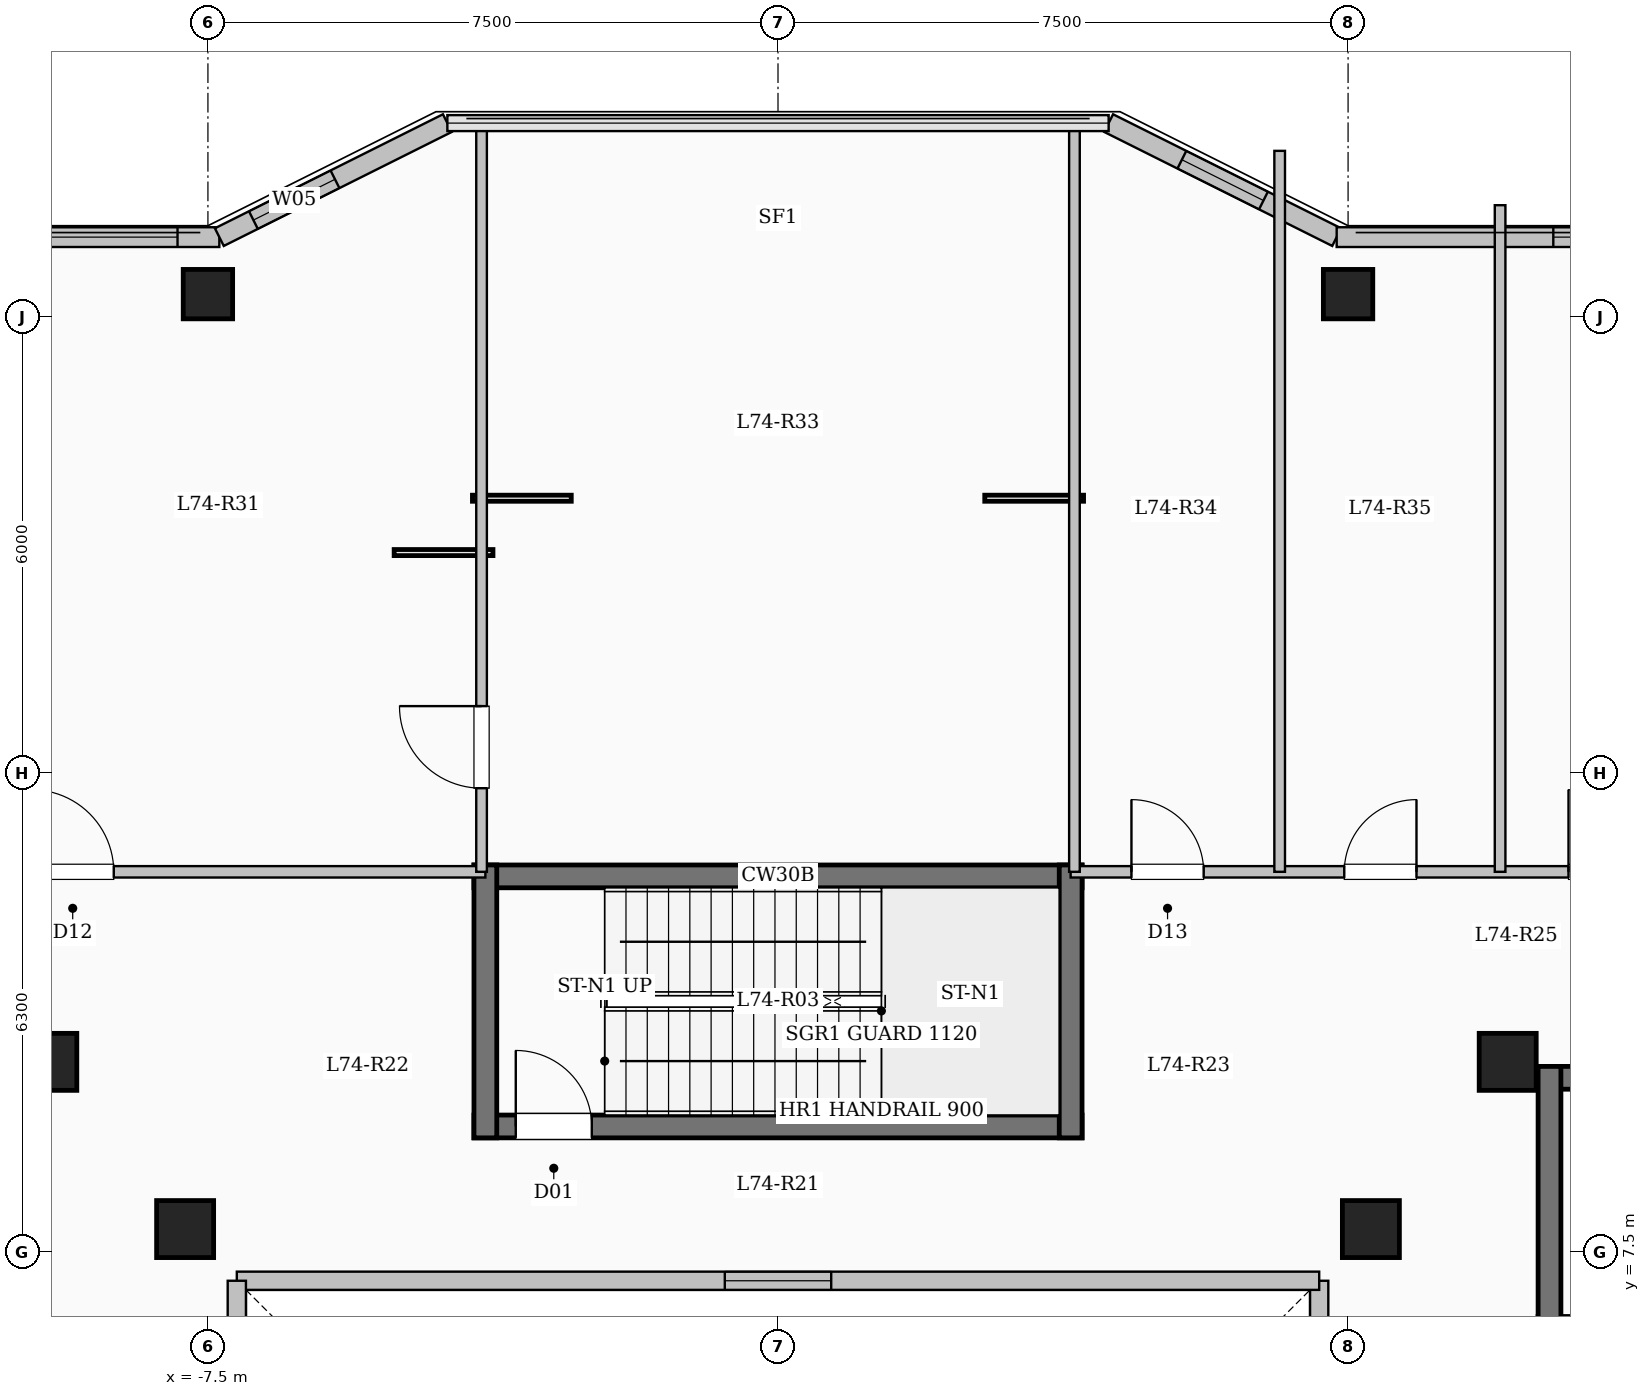
"""IFC4 building model, lengths in metres.
Left out: names, types, materials, properties, quantities, classifications, styles, units other than length and angle.
Written with IfcOpenShell. Run it as: python <this file> out.ifc"""

import sys

from ifc_helpers import new_model, si_unit, direction, frame, frame_2d, origin, origin_2d, place, context, subcontext, project, spatial, rectangle, extrude, element, fill, save


model = new_model("IFC4")
c1 = context("Model", 3, precision=1e-05, world=origin(), true_north=direction((0.0, 1.0)))
c2 = subcontext(c1, "Body", "Model", "MODEL_VIEW")
j1 = project(units=[si_unit("LENGTHUNIT", "METRE"), si_unit("PLANEANGLEUNIT", "RADIAN")], contexts=[c1])
p1 = place(None, origin())
s1 = spatial("IfcSite", under=j1, at=p1, CompositionType="ELEMENT")
p2 = place(p1, origin())
s2 = spatial("IfcBuilding", under=s1, at=p2, CompositionType="ELEMENT")
p3 = place(p2, frame((0.0, 0.0, 271.65)))
s3 = spatial("IfcBuildingStorey", under=s2, at=p3, CompositionType="ELEMENT", Elevation=271.65)
for number, where, z_axis, x_axis in (
    (1, (-7.8, 7.8, 0.0), (0.0, 0.0, 1.0), (1.0, 0.0, 0.0)),
    (2, (7.8, 7.8, 0.0), (0.0, 0.0, 1.0), (1.0, 0.0, 0.0)),
    (3, (-9.6, 10.0, 0.0), (0.0, 0.0, 1.0), (1.0, 0.0, 0.0)),
    (4, (9.6, 10.0, 0.0), (0.0, 0.0, 1.0), (1.0, 0.0, 0.0)),
):
    element("IfcColumn", number, at=place(p3, frame(where, z_axis=z_axis, x_axis=x_axis)), inside=s3, PredefinedType="COLUMN", context=c2, shape_type="SweptSolid", body=[
        extrude(rectangle(XDim=0.75, YDim=0.75, at=origin_2d()), origin(), (0.0, 0.0, 1.0), 4.65),
    ])
for number, where, z_axis, x_axis in (
    (5, (-7.5, 20.1, 0.0), (0.0, 0.0, 1.0), (1.0, 0.0, 0.0)),
    (6, (7.5, 20.1, 0.0), (0.0, 0.0, 1.0), (1.0, 0.0, 0.0)),
):
    element("IfcColumn", number, at=place(p3, frame(where, z_axis=z_axis, x_axis=x_axis)), inside=s3, PredefinedType="COLUMN", context=c2, shape_type="SweptSolid", body=[
        extrude(rectangle(XDim=0.65, YDim=0.65, at=origin_2d()), origin(), (0.0, 0.0, 1.0), 4.65),
    ])
p4 = place(p3, frame((7.12, -7.12, 0.0), z_axis=(0.0, 0.0, 1.0), x_axis=(0.0, 1.0, 0.0)))
e7 = element("IfcWall", 7, at=p4, inside=s3, PredefinedType="SOLIDWALL", context=c2, shape_type="SweptSolid", body=[
    extrude(rectangle(XDim=14.24, YDim=0.24, at=frame_2d((7.12, 0.0))), origin(), (0.0, 0.0, 1.0), 4.35),
])
p5 = place(p4, frame((6.42, 0.0, 0.95)))
e8 = element("IfcOpeningElement", 8, at=p5, cuts=e7, PredefinedType="OPENING", context=c2, shape_type="SweptSolid", body=[
    extrude(rectangle(XDim=1.4, YDim=1.5, at=frame_2d((0.7, 0.75))), frame((0.0, 0.13, 0.0), z_axis=(0.0, -1.0, 0.0), x_axis=(1.0, 0.0, 0.0)), (0.0, 0.0, 1.0), 0.26),
])
p6 = place(p3, frame((7.12, 7.12, 0.0), z_axis=(0.0, 0.0, 1.0), x_axis=(-1.0, 0.0, 0.0)))
e9 = element("IfcWall", 9, at=p6, inside=s3, PredefinedType="SOLIDWALL", context=c2, shape_type="SweptSolid", body=[
    extrude(rectangle(XDim=14.24, YDim=0.24, at=frame_2d((7.12, 0.0))), origin(), (0.0, 0.0, 1.0), 4.35),
])
p7 = place(p6, frame((6.42, 0.0, 0.95)))
e10 = element("IfcOpeningElement", 10, at=p7, cuts=e9, PredefinedType="OPENING", context=c2, shape_type="SweptSolid", body=[
    extrude(rectangle(XDim=1.4, YDim=1.5, at=frame_2d((0.7, 0.75))), frame((0.0, 0.13, 0.0), z_axis=(0.0, -1.0, 0.0), x_axis=(1.0, 0.0, 0.0)), (0.0, 0.0, 1.0), 0.26),
])
p8 = place(p3, frame((-7.12, 7.12, 0.0), z_axis=(0.0, 0.0, 1.0), x_axis=(0.0, -1.0, 0.0)))
e11 = element("IfcWall", 11, at=p8, inside=s3, PredefinedType="SOLIDWALL", context=c2, shape_type="SweptSolid", body=[
    extrude(rectangle(XDim=14.24, YDim=0.24, at=frame_2d((7.12, 0.0))), origin(), (0.0, 0.0, 1.0), 4.35),
])
p9 = place(p8, frame((6.42, 0.0, 0.95)))
e12 = element("IfcOpeningElement", 12, at=p9, cuts=e11, PredefinedType="OPENING", context=c2, shape_type="SweptSolid", body=[
    extrude(rectangle(XDim=1.4, YDim=1.5, at=frame_2d((0.7, 0.75))), frame((0.0, 0.13, 0.0), z_axis=(0.0, -1.0, 0.0), x_axis=(1.0, 0.0, 0.0)), (0.0, 0.0, 1.0), 0.26),
])
p10 = place(p3, frame((-17.85, 20.85, 0.0), z_axis=(0.0, 0.0, 1.0), x_axis=(1.0, 0.0, 0.0)))
e13 = element("IfcWall", 13, at=p10, inside=s3, PredefinedType="SOLIDWALL", context=c2, shape_type="SweptSolid", body=[
    extrude(rectangle(XDim=10.5, YDim=0.26, at=frame_2d((5.25, 0.0))), origin(), (0.0, 0.0, 1.0), 4.35),
])
p11 = place(p10, frame((2.325, 0.0, 0.85)))
e14 = element("IfcOpeningElement", 14, at=p11, cuts=e13, PredefinedType="OPENING", context=c2, shape_type="SweptSolid", body=[
    extrude(rectangle(XDim=2.3, YDim=2.2, at=frame_2d((1.15, 1.1))), frame((0.0, 0.14, 0.0), z_axis=(0.0, -1.0, 0.0), x_axis=(1.0, 0.0, 0.0)), (0.0, 0.0, 1.0), 0.28),
])
p12 = place(p10, frame((7.65, 0.0, 0.85)))
e15 = element("IfcOpeningElement", 15, at=p12, cuts=e13, PredefinedType="OPENING", context=c2, shape_type="SweptSolid", body=[
    extrude(rectangle(XDim=2.3, YDim=2.2, at=frame_2d((1.15, 1.1))), frame((0.0, 0.14, 0.0), z_axis=(0.0, -1.0, 0.0), x_axis=(1.0, 0.0, 0.0)), (0.0, 0.0, 1.0), 0.28),
])
p13 = place(p3, frame((-7.35, 20.85, 0.0), z_axis=(0.0, 0.0, 1.0), x_axis=(0.894427191, 0.4472135955, 0.0)))
e16 = element("IfcWall", 16, at=p13, inside=s3, PredefinedType="SOLIDWALL", context=c2, shape_type="SweptSolid", body=[
    extrude(rectangle(XDim=3.354, YDim=0.26, at=frame_2d((1.677, 0.0))), origin(), (0.0, 0.0, 1.0), 4.35),
])
p14 = place(p13, frame((0.501, 0.0, 0.95)))
e17 = element("IfcOpeningElement", 17, at=p14, cuts=e16, PredefinedType="OPENING", context=c2, shape_type="SweptSolid", body=[
    extrude(rectangle(XDim=1.2, YDim=1.5, at=frame_2d((0.6, 0.75))), frame((0.0, 0.14, 0.0), z_axis=(0.0, -1.0, 0.0), x_axis=(1.0, 0.0, 0.0)), (0.0, 0.0, 1.0), 0.28),
])
p15 = place(p3, frame((4.35, 22.35, 0.0), z_axis=(0.0, 0.0, 1.0), x_axis=(0.894427191, -0.4472135955, 0.0)))
e18 = element("IfcWall", 18, at=p15, inside=s3, PredefinedType="SOLIDWALL", context=c2, shape_type="SweptSolid", body=[
    extrude(rectangle(XDim=3.354, YDim=0.26, at=frame_2d((1.677, 0.0))), origin(), (0.0, 0.0, 1.0), 4.35),
])
p16 = place(p15, frame((1.077, 0.0, 0.95)))
e19 = element("IfcOpeningElement", 19, at=p16, cuts=e18, PredefinedType="OPENING", context=c2, shape_type="SweptSolid", body=[
    extrude(rectangle(XDim=1.2, YDim=1.5, at=frame_2d((0.6, 0.75))), frame((0.0, 0.14, 0.0), z_axis=(0.0, -1.0, 0.0), x_axis=(1.0, 0.0, 0.0)), (0.0, 0.0, 1.0), 0.28),
])
p17 = place(p3, frame((7.35, 20.85, 0.0), z_axis=(0.0, 0.0, 1.0), x_axis=(1.0, 0.0, 0.0)))
e20 = element("IfcWall", 20, at=p17, inside=s3, PredefinedType="SOLIDWALL", context=c2, shape_type="SweptSolid", body=[
    extrude(rectangle(XDim=10.5, YDim=0.26, at=frame_2d((5.25, 0.0))), origin(), (0.0, 0.0, 1.0), 4.35),
])
p18 = place(p17, frame((2.85, 0.0, 0.85)))
e21 = element("IfcOpeningElement", 21, at=p18, cuts=e20, PredefinedType="OPENING", context=c2, shape_type="SweptSolid", body=[
    extrude(rectangle(XDim=2.3, YDim=2.2, at=frame_2d((1.15, 1.1))), frame((0.0, 0.14, 0.0), z_axis=(0.0, -1.0, 0.0), x_axis=(1.0, 0.0, 0.0)), (0.0, 0.0, 1.0), 0.28),
])
p19 = place(p17, frame((7.025, 0.0, 0.85)))
e22 = element("IfcOpeningElement", 22, at=p19, cuts=e20, PredefinedType="OPENING", context=c2, shape_type="SweptSolid", body=[
    extrude(rectangle(XDim=2.3, YDim=2.2, at=frame_2d((1.15, 1.1))), frame((0.0, 0.14, 0.0), z_axis=(0.0, -1.0, 0.0), x_axis=(1.0, 0.0, 0.0)), (0.0, 0.0, 1.0), 0.28),
])
p20 = place(p3, frame((10.0, 9.79, 0.0), z_axis=(0.0, 0.0, 1.0), x_axis=(1.0, 0.0, 0.0)))
e23 = element("IfcWall", 23, at=p20, inside=s3, PredefinedType="SHEAR", context=c2, shape_type="SweptSolid", body=[
    extrude(rectangle(XDim=8.0, YDim=0.3, at=frame_2d((4.0, 0.0))), origin(), (0.0, 0.0, 1.0), 4.65),
])
p21 = place(p3, frame((10.0, 6.5, 0.0), z_axis=(0.0, 0.0, 1.0), x_axis=(1.0, 0.0, 0.0)))
e24 = element("IfcWall", 24, at=p21, inside=s3, PredefinedType="SHEAR", context=c2, shape_type="SweptSolid", body=[
    extrude(rectangle(XDim=8.0, YDim=0.3, at=frame_2d((4.0, 0.0))), origin(), (0.0, 0.0, 1.0), 4.65),
])
p22 = place(p21, frame((0.55, 0.0, 0.0)))
e25 = element("IfcOpeningElement", 25, at=p22, cuts=e24, PredefinedType="OPENING", context=c2, shape_type="SweptSolid", body=[
    extrude(rectangle(XDim=1.0, YDim=2.15, at=frame_2d((0.5, 1.075))), frame((0.0, 0.16, 0.0), z_axis=(0.0, -1.0, 0.0), x_axis=(1.0, 0.0, 0.0)), (0.0, 0.0, 1.0), 0.32),
])
p23 = place(p3, frame((10.15, 6.35, 0.0), z_axis=(0.0, 0.0, 1.0), x_axis=(0.0, 1.0, 0.0)))
e26 = element("IfcWall", 26, at=p23, inside=s3, PredefinedType="SHEAR", context=c2, shape_type="SweptSolid", body=[
    extrude(rectangle(XDim=3.59, YDim=0.3, at=frame_2d((1.795, 0.0))), origin(), (0.0, 0.0, 1.0), 4.65),
])
p24 = place(p3, frame((-4.0, 12.44, 0.0), z_axis=(0.0, 0.0, 1.0), x_axis=(1.0, 0.0, 0.0)))
e27 = element("IfcWall", 27, at=p24, inside=s3, PredefinedType="SHEAR", context=c2, shape_type="SweptSolid", body=[
    extrude(rectangle(XDim=8.0, YDim=0.3, at=frame_2d((4.0, 0.0))), origin(), (0.0, 0.0, 1.0), 4.65),
])
p25 = place(p3, frame((-4.0, 9.15, 0.0), z_axis=(0.0, 0.0, 1.0), x_axis=(1.0, 0.0, 0.0)))
e28 = element("IfcWall", 28, at=p25, inside=s3, PredefinedType="SHEAR", context=c2, shape_type="SweptSolid", body=[
    extrude(rectangle(XDim=8.0, YDim=0.3, at=frame_2d((4.0, 0.0))), origin(), (0.0, 0.0, 1.0), 4.65),
])
p26 = place(p25, frame((0.55, 0.0, 0.0)))
e29 = element("IfcOpeningElement", 29, at=p26, cuts=e28, PredefinedType="OPENING", context=c2, shape_type="SweptSolid", body=[
    extrude(rectangle(XDim=1.0, YDim=2.15, at=frame_2d((0.5, 1.075))), frame((0.0, 0.16, 0.0), z_axis=(0.0, -1.0, 0.0), x_axis=(1.0, 0.0, 0.0)), (0.0, 0.0, 1.0), 0.32),
])
for number, where, z_axis, x_axis in (
    (30, (-3.85, 9.0, 0.0), (0.0, 0.0, 1.0), (0.0, 1.0, 0.0)),
    (31, (3.85, 9.0, 0.0), (0.0, 0.0, 1.0), (0.0, 1.0, 0.0)),
):
    element("IfcWall", number, at=place(p3, frame(where, z_axis=z_axis, x_axis=x_axis)), inside=s3, PredefinedType="SHEAR", context=c2, shape_type="SweptSolid", body=[
        extrude(rectangle(XDim=3.59, YDim=0.3, at=frame_2d((1.795, 0.0))), origin(), (0.0, 0.0, 1.0), 4.65),
    ])
p27 = place(p3, frame((-17.75, 12.5, 0.0), z_axis=(0.0, 0.0, 1.0), x_axis=(1.0, 0.0, 0.0)))
e32 = element("IfcWall", 32, at=p27, inside=s3, PredefinedType="PARTITIONING", context=c2, shape_type="SweptSolid", body=[
    extrude(rectangle(XDim=13.9, YDim=0.15, at=frame_2d((6.95, 0.0))), origin(), (0.0, 0.0, 1.0), 4.35),
])
p28 = place(p27, frame((1.2, 0.0, 0.0)))
e33 = element("IfcOpeningElement", 33, at=p28, cuts=e32, PredefinedType="OPENING", context=c2, shape_type="SweptSolid", body=[
    extrude(rectangle(XDim=1.2, YDim=2.15, at=frame_2d((0.6, 1.075))), frame((0.0, 0.085, 0.0), z_axis=(0.0, -1.0, 0.0), x_axis=(1.0, 0.0, 0.0)), (0.0, 0.0, 1.0), 0.17),
])
p29 = place(p27, frame((7.931, 0.0, 0.0)))
e34 = element("IfcOpeningElement", 34, at=p29, cuts=e32, PredefinedType="OPENING", context=c2, shape_type="SweptSolid", body=[
    extrude(rectangle(XDim=1.08, YDim=2.15, at=frame_2d((0.54, 1.075))), frame((0.0, 0.085, 0.0), z_axis=(0.0, -1.0, 0.0), x_axis=(1.0, 0.0, 0.0)), (0.0, 0.0, 1.0), 0.17),
])
p30 = place(p3, frame((3.85, 12.5, 0.0), z_axis=(0.0, 0.0, 1.0), x_axis=(1.0, 0.0, 0.0)))
e35 = element("IfcWall", 35, at=p30, inside=s3, PredefinedType="PARTITIONING", context=c2, shape_type="SweptSolid", body=[
    extrude(rectangle(XDim=13.9, YDim=0.15, at=frame_2d((6.95, 0.0))), origin(), (0.0, 0.0, 1.0), 4.35),
])
p31 = place(p30, frame((0.8, 0.0, 0.0)))
e36 = element("IfcOpeningElement", 36, at=p31, cuts=e35, PredefinedType="OPENING", context=c2, shape_type="SweptSolid", body=[
    extrude(rectangle(XDim=0.95, YDim=2.15, at=frame_2d((0.475, 1.075))), frame((0.0, 0.085, 0.0), z_axis=(0.0, -1.0, 0.0), x_axis=(1.0, 0.0, 0.0)), (0.0, 0.0, 1.0), 0.17),
])
p32 = place(p30, frame((3.6, 0.0, 0.0)))
e37 = element("IfcOpeningElement", 37, at=p32, cuts=e35, PredefinedType="OPENING", context=c2, shape_type="SweptSolid", body=[
    extrude(rectangle(XDim=0.95, YDim=2.15, at=frame_2d((0.475, 1.075))), frame((0.0, 0.085, 0.0), z_axis=(0.0, -1.0, 0.0), x_axis=(1.0, 0.0, 0.0)), (0.0, 0.0, 1.0), 0.17),
])
p33 = place(p30, frame((6.55, 0.0, 0.0)))
e38 = element("IfcOpeningElement", 38, at=p33, cuts=e35, PredefinedType="OPENING", context=c2, shape_type="SweptSolid", body=[
    extrude(rectangle(XDim=1.08, YDim=2.15, at=frame_2d((0.54, 1.075))), frame((0.0, 0.085, 0.0), z_axis=(0.0, -1.0, 0.0), x_axis=(1.0, 0.0, 0.0)), (0.0, 0.0, 1.0), 0.17),
])
p34 = place(p30, frame((10.462, 0.0, 0.0)))
e39 = element("IfcOpeningElement", 39, at=p34, cuts=e35, PredefinedType="OPENING", context=c2, shape_type="SweptSolid", body=[
    extrude(rectangle(XDim=1.2, YDim=2.15, at=frame_2d((0.6, 1.075))), frame((0.0, 0.085, 0.0), z_axis=(0.0, -1.0, 0.0), x_axis=(1.0, 0.0, 0.0)), (0.0, 0.0, 1.0), 0.17),
])
p35 = place(p3, frame((-3.9, 12.5, 0.0), z_axis=(0.0, 0.0, 1.0), x_axis=(0.0, 1.0, 0.0)))
e40 = element("IfcWall", 40, at=p35, inside=s3, PredefinedType="PARTITIONING", context=c2, shape_type="SweptSolid", body=[
    extrude(rectangle(XDim=9.88, YDim=0.14, at=frame_2d((4.94, 0.0))), origin(), (0.0, 0.0, 1.0), 4.35),
])
p36 = place(p35, frame((1.1, 0.0, 0.0)))
e41 = element("IfcOpeningElement", 41, at=p36, cuts=e40, PredefinedType="OPENING", context=c2, shape_type="SweptSolid", body=[
    extrude(rectangle(XDim=1.08, YDim=2.15, at=frame_2d((0.54, 1.075))), frame((0.0, 0.08, 0.0), z_axis=(0.0, -1.0, 0.0), x_axis=(1.0, 0.0, 0.0)), (0.0, 0.0, 1.0), 0.16),
])
p37 = place(p3, frame((3.9, 12.5, 0.0), z_axis=(0.0, 0.0, 1.0), x_axis=(0.0, 1.0, 0.0)))
e42 = element("IfcWall", 42, at=p37, inside=s3, PredefinedType="PARTITIONING", context=c2, shape_type="SweptSolid", body=[
    extrude(rectangle(XDim=9.88, YDim=0.14, at=frame_2d((4.94, 0.0))), origin(), (0.0, 0.0, 1.0), 4.35),
])
p38 = place(p3, frame((6.6, 12.5, 0.0), z_axis=(0.0, 0.0, 1.0), x_axis=(0.0, 1.0, 0.0)))
e43 = element("IfcWall", 43, at=p38, inside=s3, PredefinedType="PARTITIONING", context=c2, shape_type="SweptSolid", body=[
    extrude(rectangle(XDim=9.485, YDim=0.14, at=frame_2d((4.743, 0.0))), origin(), (0.0, 0.0, 1.0), 4.35),
])
p39 = place(p3, frame((9.5, 12.5, 0.0), z_axis=(0.0, 0.0, 1.0), x_axis=(0.0, 1.0, 0.0)))
e44 = element("IfcWall", 44, at=p39, inside=s3, PredefinedType="PARTITIONING", context=c2, shape_type="SweptSolid", body=[
    extrude(rectangle(XDim=8.77, YDim=0.14, at=frame_2d((4.385, 0.0))), origin(), (0.0, 0.0, 1.0), 4.35),
])
p40 = place(p7, origin())
e45 = element("IfcWindow", 45, at=p40, inside=s3, PartitioningType="SINGLE_PANEL", PredefinedType="WINDOW", context=c2, shape_type="SweptSolid", body=[
    extrude(rectangle(XDim=1.4, YDim=1.5, at=frame_2d((0.7, 0.75))), frame((0.0, 0.03, 0.0), z_axis=(0.0, -1.0, 0.0), x_axis=(1.0, 0.0, 0.0)), (0.0, 0.0, 1.0), 0.06),
])
fill(e10, e45)
p41 = place(p12, origin())
e46 = element("IfcWindow", 46, at=p41, inside=s3, PartitioningType="SINGLE_PANEL", PredefinedType="WINDOW", context=c2, shape_type="SweptSolid", body=[
    extrude(rectangle(XDim=2.3, YDim=2.2, at=frame_2d((1.15, 1.1))), frame((0.0, 0.03, 0.0), z_axis=(0.0, -1.0, 0.0), x_axis=(1.0, 0.0, 0.0)), (0.0, 0.0, 1.0), 0.06),
])
fill(e15, e46)
p42 = place(p14, origin())
e47 = element("IfcWindow", 47, at=p42, inside=s3, PartitioningType="SINGLE_PANEL", PredefinedType="WINDOW", context=c2, shape_type="SweptSolid", body=[
    extrude(rectangle(XDim=1.2, YDim=1.5, at=frame_2d((0.6, 0.75))), frame((0.0, 0.03, 0.0), z_axis=(0.0, -1.0, 0.0), x_axis=(1.0, 0.0, 0.0)), (0.0, 0.0, 1.0), 0.06),
])
fill(e17, e47)
p43 = place(p16, origin())
e48 = element("IfcWindow", 48, at=p43, inside=s3, PartitioningType="SINGLE_PANEL", PredefinedType="WINDOW", context=c2, shape_type="SweptSolid", body=[
    extrude(rectangle(XDim=1.2, YDim=1.5, at=frame_2d((0.6, 0.75))), frame((0.0, 0.03, 0.0), z_axis=(0.0, -1.0, 0.0), x_axis=(1.0, 0.0, 0.0)), (0.0, 0.0, 1.0), 0.06),
])
fill(e19, e48)
p44 = place(p18, origin())
e49 = element("IfcWindow", 49, at=p44, inside=s3, PartitioningType="SINGLE_PANEL", PredefinedType="WINDOW", context=c2, shape_type="SweptSolid", body=[
    extrude(rectangle(XDim=2.3, YDim=2.2, at=frame_2d((1.15, 1.1))), frame((0.0, 0.03, 0.0), z_axis=(0.0, -1.0, 0.0), x_axis=(1.0, 0.0, 0.0)), (0.0, 0.0, 1.0), 0.06),
])
fill(e21, e49)
p45 = place(p26, origin())
e50 = element("IfcDoor", 50, at=p45, inside=s3, OperationType="SINGLE_SWING_LEFT", PredefinedType="DOOR", context=c2, shape_type="SweptSolid", body=[
    extrude(rectangle(XDim=1.0, YDim=2.15, at=frame_2d((0.5, 1.075))), frame((0.0, 0.025, 0.0), z_axis=(0.0, -1.0, 0.0), x_axis=(1.0, 0.0, 0.0)), (0.0, 0.0, 1.0), 0.05),
])
fill(e29, e50)
p46 = place(p29, origin())
e51 = element("IfcDoor", 51, at=p46, inside=s3, OperationType="SINGLE_SWING_LEFT", PredefinedType="DOOR", context=c2, shape_type="SweptSolid", body=[
    extrude(rectangle(XDim=1.08, YDim=2.15, at=frame_2d((0.54, 1.075))), frame((0.0, 0.025, 0.0), z_axis=(0.0, -1.0, 0.0), x_axis=(1.0, 0.0, 0.0)), (0.0, 0.0, 1.0), 0.05),
])
fill(e34, e51)
p47 = place(p36, origin())
e52 = element("IfcDoor", 52, at=p47, inside=s3, OperationType="SINGLE_SWING_RIGHT", PredefinedType="DOOR", context=c2, shape_type="SweptSolid", body=[
    extrude(rectangle(XDim=1.08, YDim=2.15, at=frame_2d((0.54, 1.075))), frame((0.0, 0.025, 0.0), z_axis=(0.0, -1.0, 0.0), x_axis=(1.0, 0.0, 0.0)), (0.0, 0.0, 1.0), 0.05),
])
fill(e41, e52)
p48 = place(p31, origin())
e53 = element("IfcDoor", 53, at=p48, inside=s3, OperationType="SINGLE_SWING_LEFT", PredefinedType="DOOR", context=c2, shape_type="SweptSolid", body=[
    extrude(rectangle(XDim=0.95, YDim=2.15, at=frame_2d((0.475, 1.075))), frame((0.0, 0.025, 0.0), z_axis=(0.0, -1.0, 0.0), x_axis=(1.0, 0.0, 0.0)), (0.0, 0.0, 1.0), 0.05),
])
fill(e36, e53)
p49 = place(p32, origin())
e54 = element("IfcDoor", 54, at=p49, inside=s3, OperationType="SINGLE_SWING_RIGHT", PredefinedType="DOOR", context=c2, shape_type="SweptSolid", body=[
    extrude(rectangle(XDim=0.95, YDim=2.15, at=frame_2d((0.475, 1.075))), frame((0.0, 0.025, 0.0), z_axis=(0.0, -1.0, 0.0), x_axis=(1.0, 0.0, 0.0)), (0.0, 0.0, 1.0), 0.05),
])
fill(e37, e54)
p50 = place(p33, origin())
e55 = element("IfcDoor", 55, at=p50, inside=s3, OperationType="SINGLE_SWING_LEFT", PredefinedType="DOOR", context=c2, shape_type="SweptSolid", body=[
    extrude(rectangle(XDim=1.08, YDim=2.15, at=frame_2d((0.54, 1.075))), frame((0.0, 0.025, 0.0), z_axis=(0.0, -1.0, 0.0), x_axis=(1.0, 0.0, 0.0)), (0.0, 0.0, 1.0), 0.05),
])
fill(e38, e55)
save(model, sys.argv[1])
